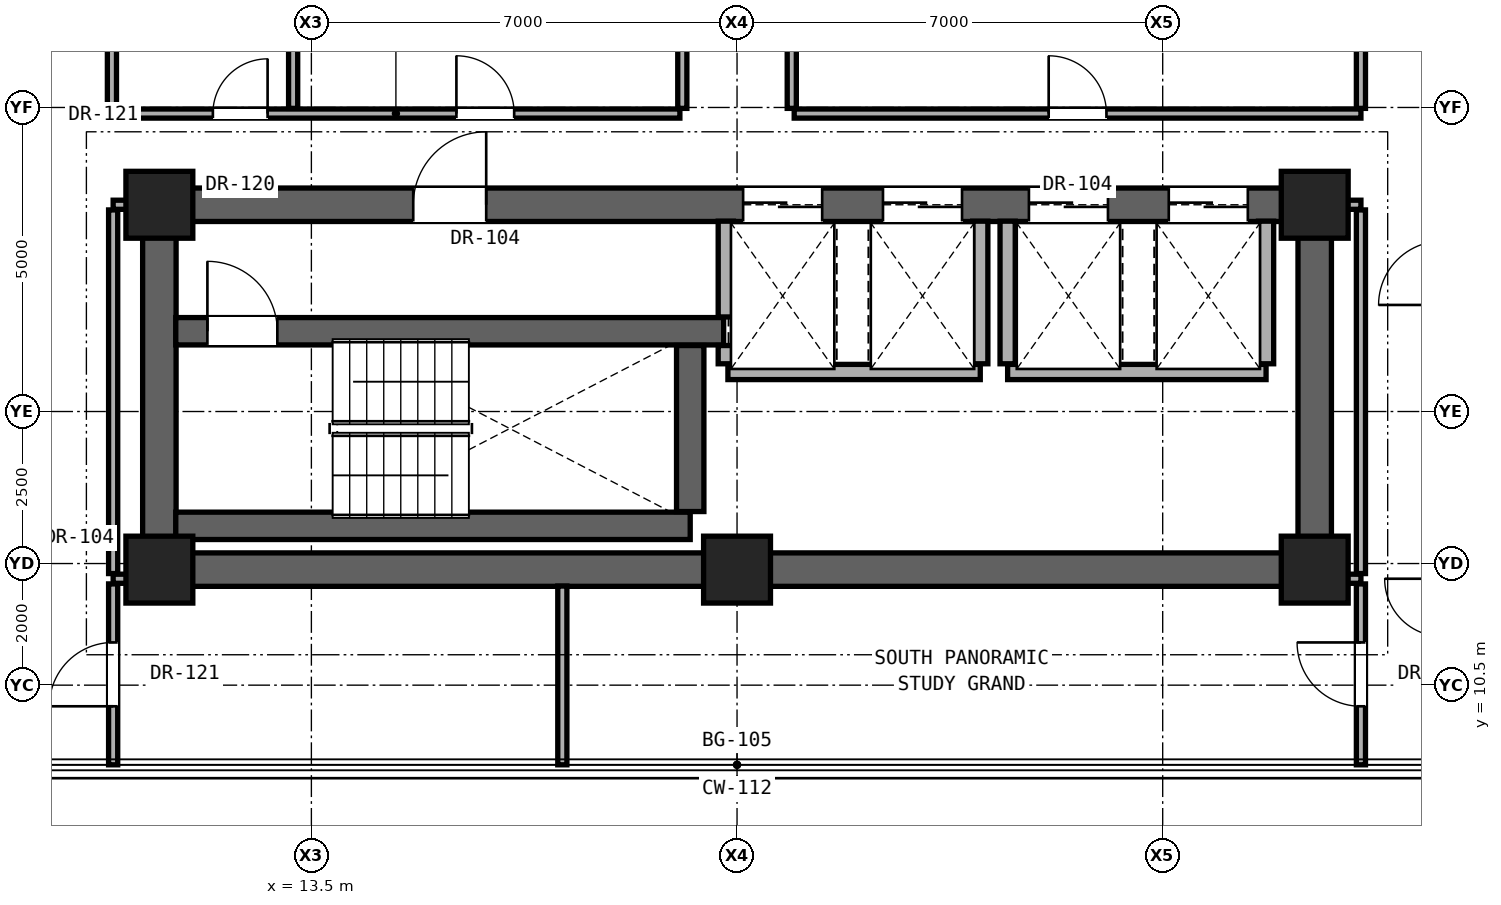
"""IFC4 building model, lengths in metres.
Left out: names, types, materials, properties, quantities, classifications, styles, units other than length and angle.
Written with IfcOpenShell. Run it as: python <this file> out.ifc"""

import sys

from ifc_helpers import new_model, si_unit, direction, frame, frame_2d, origin, origin_2d, place, context, subcontext, project, spatial, rectangle, extrude, element, fill, save


model = new_model("IFC4")
c1 = context("Model", 3, precision=1e-05, world=origin(), true_north=direction((0.0, 1.0)))
c2 = subcontext(c1, "Body", "Model", "MODEL_VIEW")
j1 = project(units=[si_unit("LENGTHUNIT", "METRE"), si_unit("PLANEANGLEUNIT", "RADIAN")], contexts=[c1])
p1 = place(None, origin())
s1 = spatial("IfcSite", under=j1, at=p1, CompositionType="ELEMENT")
p2 = place(p1, origin())
s2 = spatial("IfcBuilding", under=s1, at=p2, CompositionType="ELEMENT")
p3 = place(p2, frame((0.0, 0.0, 134.6)))
s3 = spatial("IfcBuildingStorey", under=s2, at=p3, CompositionType="ELEMENT", Elevation=134.6)
for number, where, z_axis, x_axis in (
    (1, (11.0, 12.4, 0.0), (0.0, 0.0, 1.0), (1.0, 0.0, 0.0)),
    (2, (20.5, 12.4, 0.0), (0.0, 0.0, 1.0), (1.0, 0.0, 0.0)),
    (3, (30.0, 12.4, 0.0), (0.0, 0.0, 1.0), (1.0, 0.0, 0.0)),
    (4, (11.0, 18.4, 0.0), (0.0, 0.0, 1.0), (1.0, 0.0, 0.0)),
    (5, (30.0, 18.4, 0.0), (0.0, 0.0, 1.0), (1.0, 0.0, 0.0)),
):
    element("IfcColumn", number, at=place(p3, frame(where, z_axis=z_axis, x_axis=x_axis)), inside=s3, PredefinedType="COLUMN", context=c2, shape_type="SweptSolid", body=[
        extrude(rectangle(XDim=1.1, YDim=1.1, at=origin_2d()), origin(), (0.0, 0.0, 1.0), 3.3),
    ])
p4 = place(p3, frame((11.0, 12.4, 0.0), z_axis=(0.0, 0.0, 1.0), x_axis=(1.0, 0.0, 0.0)))
e6 = element("IfcWall", 6, at=p4, inside=s3, PredefinedType="SHEAR", context=c2, shape_type="SweptSolid", body=[
    extrude(rectangle(XDim=19.0, YDim=0.55, at=frame_2d((9.5, 0.0))), origin(), (0.0, 0.0, 1.0), 3.08),
])
for number, where, z_axis, x_axis in (
    (7, (11.0, 12.4, 0.0), (0.0, 0.0, 1.0), (0.0, 1.0, 0.0)),
    (8, (30.0, 12.4, 0.0), (0.0, 0.0, 1.0), (0.0, 1.0, 0.0)),
):
    element("IfcWall", number, at=place(p3, frame(where, z_axis=z_axis, x_axis=x_axis)), inside=s3, PredefinedType="SHEAR", context=c2, shape_type="SweptSolid", body=[
        extrude(rectangle(XDim=6.0, YDim=0.55, at=frame_2d((3.0, 0.0))), origin(), (0.0, 0.0, 1.0), 3.08),
    ])
p5 = place(p3, frame((11.0, 18.4, 0.0), z_axis=(0.0, 0.0, 1.0), x_axis=(1.0, 0.0, 0.0)))
e9 = element("IfcWall", 9, at=p5, inside=s3, PredefinedType="SHEAR", context=c2, shape_type="SweptSolid", body=[
    extrude(rectangle(XDim=19.0, YDim=0.55, at=frame_2d((9.5, 0.0))), origin(), (0.0, 0.0, 1.0), 3.08),
])
p6 = place(p5, frame((4.175, 0.0, 0.0)))
e10 = element("IfcOpeningElement", 10, at=p6, cuts=e9, PredefinedType="OPENING", context=c2, shape_type="SweptSolid", body=[
    extrude(rectangle(XDim=1.2, YDim=2.25, at=frame_2d((0.6, 1.125))), frame((0.0, 0.285, 0.0), z_axis=(0.0, -1.0, 0.0), x_axis=(1.0, 0.0, 0.0)), (0.0, 0.0, 1.0), 0.57),
])
p7 = place(p5, frame((9.6, 0.0, 0.0)))
e11 = element("IfcOpeningElement", 11, at=p7, cuts=e9, PredefinedType="OPENING", context=c2, shape_type="SweptSolid", body=[
    extrude(rectangle(XDim=1.3, YDim=2.3, at=frame_2d((0.65, 1.15))), frame((0.0, 0.285, 0.0), z_axis=(0.0, -1.0, 0.0), x_axis=(1.0, 0.0, 0.0)), (0.0, 0.0, 1.0), 0.57),
])
p8 = place(p5, frame((11.9, 0.0, 0.0)))
e12 = element("IfcOpeningElement", 12, at=p8, cuts=e9, PredefinedType="OPENING", context=c2, shape_type="SweptSolid", body=[
    extrude(rectangle(XDim=1.3, YDim=2.3, at=frame_2d((0.65, 1.15))), frame((0.0, 0.285, 0.0), z_axis=(0.0, -1.0, 0.0), x_axis=(1.0, 0.0, 0.0)), (0.0, 0.0, 1.0), 0.57),
])
p9 = place(p5, frame((14.3, 0.0, 0.0)))
e13 = element("IfcOpeningElement", 13, at=p9, cuts=e9, PredefinedType="OPENING", context=c2, shape_type="SweptSolid", body=[
    extrude(rectangle(XDim=1.3, YDim=2.3, at=frame_2d((0.65, 1.15))), frame((0.0, 0.285, 0.0), z_axis=(0.0, -1.0, 0.0), x_axis=(1.0, 0.0, 0.0)), (0.0, 0.0, 1.0), 0.57),
])
p10 = place(p5, frame((16.6, 0.0, 0.0)))
e14 = element("IfcOpeningElement", 14, at=p10, cuts=e9, PredefinedType="OPENING", context=c2, shape_type="SweptSolid", body=[
    extrude(rectangle(XDim=1.3, YDim=2.3, at=frame_2d((0.65, 1.15))), frame((0.0, 0.285, 0.0), z_axis=(0.0, -1.0, 0.0), x_axis=(1.0, 0.0, 0.0)), (0.0, 0.0, 1.0), 0.57),
])
for number, where, z_axis, x_axis in (
    (15, (10.24, 12.25, 0.0), (0.0, 0.0, 1.0), (1.0, 0.0, 0.0)),
    (16, (30.27, 12.25, 0.0), (0.0, 0.0, 1.0), (1.0, 0.0, 0.0)),
):
    element("IfcWall", number, at=place(p3, frame(where, z_axis=z_axis, x_axis=x_axis)), inside=s3, PredefinedType="PARTITIONING", context=c2, shape_type="SweptSolid", body=[
        extrude(rectangle(XDim=0.49, YDim=0.15, at=frame_2d((0.245, 0.0))), origin(), (0.0, 0.0, 1.0), 3.08),
    ])
p11 = place(p3, frame((11.27, 13.12, 0.0), z_axis=(0.0, 0.0, 1.0), x_axis=(1.0, 0.0, 0.0)))
e17 = element("IfcWall", 17, at=p11, inside=s3, PredefinedType="SHEAR", context=c2, shape_type="SweptSolid", body=[
    extrude(rectangle(XDim=8.46, YDim=0.45, at=frame_2d((4.23, 0.0))), origin(), (0.0, 0.0, 1.0), 3.08),
])
p12 = place(p3, frame((20.35, 15.65, 0.0), z_axis=(0.0, 0.0, 1.0), x_axis=(1.0, 0.0, 0.0)))
e18 = element("IfcWall", 18, at=p12, inside=s3, PredefinedType="SOLIDWALL", context=c2, shape_type="SweptSolid", body=[
    extrude(rectangle(XDim=4.15, YDim=0.25, at=frame_2d((2.075, 0.0))), origin(), (0.0, 0.0, 1.0), 3.08),
])
p13 = place(p3, frame((24.95, 15.65, 0.0), z_axis=(0.0, 0.0, 1.0), x_axis=(1.0, 0.0, 0.0)))
e19 = element("IfcWall", 19, at=p13, inside=s3, PredefinedType="SOLIDWALL", context=c2, shape_type="SweptSolid", body=[
    extrude(rectangle(XDim=4.25, YDim=0.25, at=frame_2d((2.125, 0.0))), origin(), (0.0, 0.0, 1.0), 3.08),
])
p14 = place(p3, frame((11.27, 16.32, 0.0), z_axis=(0.0, 0.0, 1.0), x_axis=(1.0, 0.0, 0.0)))
e20 = element("IfcWall", 20, at=p14, inside=s3, PredefinedType="SHEAR", context=c2, shape_type="SweptSolid", body=[
    extrude(rectangle(XDim=9.01, YDim=0.45, at=frame_2d((4.505, 0.0))), origin(), (0.0, 0.0, 1.0), 3.08),
])
p15 = place(p14, frame((0.52, 0.0, 0.0)))
e21 = element("IfcOpeningElement", 21, at=p15, cuts=e20, PredefinedType="OPENING", context=c2, shape_type="SweptSolid", body=[
    extrude(rectangle(XDim=1.15, YDim=2.2, at=frame_2d((0.575, 1.1))), frame((0.0, 0.235, 0.0), z_axis=(0.0, -1.0, 0.0), x_axis=(1.0, 0.0, 0.0)), (0.0, 0.0, 1.0), 0.47),
])
for number, where, z_axis, x_axis in (
    (22, (10.24, 18.4, 0.0), (0.0, 0.0, 1.0), (1.0, 0.0, 0.0)),
    (23, (30.27, 18.4, 0.0), (0.0, 0.0, 1.0), (1.0, 0.0, 0.0)),
):
    element("IfcWall", number, at=place(p3, frame(where, z_axis=z_axis, x_axis=x_axis)), inside=s3, PredefinedType="PARTITIONING", context=c2, shape_type="SweptSolid", body=[
        extrude(rectangle(XDim=0.49, YDim=0.15, at=frame_2d((0.245, 0.0))), origin(), (0.0, 0.0, 1.0), 2.456),
    ])
p16 = place(p3, frame((10.22, 19.9, 0.0), z_axis=(0.0, 0.0, 1.0), x_axis=(1.0, 0.0, 0.0)))
e24 = element("IfcWall", 24, at=p16, inside=s3, PredefinedType="PARTITIONING", context=c2, shape_type="SweptSolid", body=[
    extrude(rectangle(XDim=9.34, YDim=0.15, at=frame_2d((4.67, 0.0))), origin(), (0.0, 0.0, 1.0), 2.216),
])
p17 = place(p16, frame((1.66, 0.0, 0.0)))
e25 = element("IfcOpeningElement", 25, at=p17, cuts=e24, PredefinedType="OPENING", context=c2, shape_type="SweptSolid", body=[
    extrude(rectangle(XDim=0.9, YDim=2.1, at=frame_2d((0.45, 1.05))), frame((0.0, 0.085, 0.0), z_axis=(0.0, -1.0, 0.0), x_axis=(1.0, 0.0, 0.0)), (0.0, 0.0, 1.0), 0.17),
])
p18 = place(p16, frame((5.665, 0.0, 0.0)))
e26 = element("IfcOpeningElement", 26, at=p18, cuts=e24, PredefinedType="OPENING", context=c2, shape_type="SweptSolid", body=[
    extrude(rectangle(XDim=0.95, YDim=2.15, at=frame_2d((0.475, 1.075))), frame((0.0, 0.085, 0.0), z_axis=(0.0, -1.0, 0.0), x_axis=(1.0, 0.0, 0.0)), (0.0, 0.0, 1.0), 0.17),
])
p19 = place(p3, frame((21.44, 19.9, 0.0), z_axis=(0.0, 0.0, 1.0), x_axis=(1.0, 0.0, 0.0)))
e27 = element("IfcWall", 27, at=p19, inside=s3, PredefinedType="PARTITIONING", context=c2, shape_type="SweptSolid", body=[
    extrude(rectangle(XDim=9.32, YDim=0.15, at=frame_2d((4.66, 0.0))), origin(), (0.0, 0.0, 1.0), 2.216),
])
p20 = place(p19, frame((4.185, 0.0, 0.0)))
e28 = element("IfcOpeningElement", 28, at=p20, cuts=e27, PredefinedType="OPENING", context=c2, shape_type="SweptSolid", body=[
    extrude(rectangle(XDim=0.95, YDim=2.15, at=frame_2d((0.475, 1.075))), frame((0.0, 0.085, 0.0), z_axis=(0.0, -1.0, 0.0), x_axis=(1.0, 0.0, 0.0)), (0.0, 0.0, 1.0), 0.17),
])
p21 = place(p3, frame((10.22, 19.985, 0.0), z_axis=(0.0, 0.0, 1.0), x_axis=(0.0, 1.0, 0.0)))
e29 = element("IfcWall", 29, at=p21, inside=s3, PredefinedType="PARTITIONING", context=c2, shape_type="SweptSolid", body=[
    extrude(rectangle(XDim=2.78, YDim=0.15, at=frame_2d((1.39, 0.0))), origin(), (0.0, 0.0, 1.0), 3.08),
])
p22 = place(p3, frame((10.24, 9.19, 0.0), z_axis=(0.0, 0.0, 1.0), x_axis=(0.0, 1.0, 0.0)))
e30 = element("IfcWall", 30, at=p22, inside=s3, PredefinedType="PARTITIONING", context=c2, shape_type="SweptSolid", body=[
    extrude(rectangle(XDim=2.975, YDim=0.15, at=frame_2d((1.488, 0.0))), origin(), (0.0, 0.0, 1.0), 3.08),
])
p23 = place(p22, frame((0.962, 0.0, 0.0)))
e31 = element("IfcOpeningElement", 31, at=p23, cuts=e30, PredefinedType="OPENING", context=c2, shape_type="SweptSolid", body=[
    extrude(rectangle(XDim=1.05, YDim=2.2, at=frame_2d((0.525, 1.1))), frame((0.0, 0.085, 0.0), z_axis=(0.0, -1.0, 0.0), x_axis=(1.0, 0.0, 0.0)), (0.0, 0.0, 1.0), 0.17),
])
p24 = place(p3, frame((10.24, 12.335, 0.0), z_axis=(0.0, 0.0, 1.0), x_axis=(0.0, 1.0, 0.0)))
e32 = element("IfcWall", 32, at=p24, inside=s3, PredefinedType="PARTITIONING", context=c2, shape_type="SweptSolid", body=[
    extrude(rectangle(XDim=5.98, YDim=0.15, at=frame_2d((2.99, 0.0))), origin(), (0.0, 0.0, 1.0), 2.456),
])
p25 = place(p3, frame((13.2, 19.985, 0.0), z_axis=(0.0, 0.0, 1.0), x_axis=(0.0, 1.0, 0.0)))
e33 = element("IfcWall", 33, at=p25, inside=s3, PredefinedType="PARTITIONING", context=c2, shape_type="SweptSolid", body=[
    extrude(rectangle(XDim=2.78, YDim=0.15, at=frame_2d((1.39, 0.0))), origin(), (0.0, 0.0, 1.0), 3.08),
])
p26 = place(p3, frame((17.627, 9.19, 0.0), z_axis=(0.0, 0.0, 1.0), x_axis=(0.0, 1.0, 0.0)))
e34 = element("IfcWall", 34, at=p26, inside=s3, PredefinedType="PARTITIONING", context=c2, shape_type="SweptSolid", body=[
    extrude(rectangle(XDim=2.94, YDim=0.15, at=frame_2d((1.47, 0.0))), origin(), (0.0, 0.0, 1.0), 3.08),
])
p27 = place(p3, frame((19.6, 19.985, 0.0), z_axis=(0.0, 0.0, 1.0), x_axis=(0.0, 1.0, 0.0)))
e35 = element("IfcWall", 35, at=p27, inside=s3, PredefinedType="PARTITIONING", context=c2, shape_type="SweptSolid", body=[
    extrude(rectangle(XDim=5.53, YDim=0.15, at=frame_2d((2.765, 0.0))), origin(), (0.0, 0.0, 1.0), 2.216),
])
p28 = place(p3, frame((19.73, 13.355, 0.0), z_axis=(0.0, 0.0, 1.0), x_axis=(0.0, 1.0, 0.0)))
e36 = element("IfcWall", 36, at=p28, inside=s3, PredefinedType="SHEAR", context=c2, shape_type="SweptSolid", body=[
    extrude(rectangle(XDim=2.73, YDim=0.45, at=frame_2d((1.365, 0.0))), origin(), (0.0, 0.0, 1.0), 3.08),
])
p29 = place(p3, frame((20.315, 15.785, 0.0), z_axis=(0.0, 0.0, 1.0), x_axis=(0.0, 1.0, 0.0)))
e37 = element("IfcWall", 37, at=p29, inside=s3, PredefinedType="SOLIDWALL", context=c2, shape_type="SweptSolid", body=[
    extrude(rectangle(XDim=0.3, YDim=0.25, at=frame_2d((0.15, 0.0))), origin(), (0.0, 0.0, 1.0), 3.08),
])
p30 = place(p3, frame((20.315, 16.555, 0.0), z_axis=(0.0, 0.0, 1.0), x_axis=(0.0, 1.0, 0.0)))
e38 = element("IfcWall", 38, at=p30, inside=s3, PredefinedType="SOLIDWALL", context=c2, shape_type="SweptSolid", body=[
    extrude(rectangle(XDim=1.575, YDim=0.25, at=frame_2d((0.788, 0.0))), origin(), (0.0, 0.0, 1.0), 3.08),
])
p31 = place(p3, frame((21.4, 19.985, 0.0), z_axis=(0.0, 0.0, 1.0), x_axis=(0.0, 1.0, 0.0)))
e39 = element("IfcWall", 39, at=p31, inside=s3, PredefinedType="PARTITIONING", context=c2, shape_type="SweptSolid", body=[
    extrude(rectangle(XDim=5.53, YDim=0.15, at=frame_2d((2.765, 0.0))), origin(), (0.0, 0.0, 1.0), 2.216),
])
for number, where, z_axis, x_axis in (
    (40, (24.5, 15.785, 0.0), (0.0, 0.0, 1.0), (0.0, 1.0, 0.0)),
    (41, (24.95, 15.785, 0.0), (0.0, 0.0, 1.0), (0.0, 1.0, 0.0)),
    (42, (29.2, 15.785, 0.0), (0.0, 0.0, 1.0), (0.0, 1.0, 0.0)),
):
    element("IfcWall", number, at=place(p3, frame(where, z_axis=z_axis, x_axis=x_axis)), inside=s3, PredefinedType="SOLIDWALL", context=c2, shape_type="SweptSolid", body=[
        extrude(rectangle(XDim=2.345, YDim=0.25, at=frame_2d((1.172, 0.0))), origin(), (0.0, 0.0, 1.0), 3.08),
    ])
p32 = place(p3, frame((30.76, 9.19, 0.0), z_axis=(0.0, 0.0, 1.0), x_axis=(0.0, 1.0, 0.0)))
e43 = element("IfcWall", 43, at=p32, inside=s3, PredefinedType="PARTITIONING", context=c2, shape_type="SweptSolid", body=[
    extrude(rectangle(XDim=2.975, YDim=0.15, at=frame_2d((1.488, 0.0))), origin(), (0.0, 0.0, 1.0), 3.08),
])
p33 = place(p32, frame((0.962, 0.0, 0.0)))
e44 = element("IfcOpeningElement", 44, at=p33, cuts=e43, PredefinedType="OPENING", context=c2, shape_type="SweptSolid", body=[
    extrude(rectangle(XDim=1.05, YDim=2.2, at=frame_2d((0.525, 1.1))), frame((0.0, 0.085, 0.0), z_axis=(0.0, -1.0, 0.0), x_axis=(1.0, 0.0, 0.0)), (0.0, 0.0, 1.0), 0.17),
])
p34 = place(p3, frame((30.76, 12.335, 0.0), z_axis=(0.0, 0.0, 1.0), x_axis=(0.0, 1.0, 0.0)))
e45 = element("IfcWall", 45, at=p34, inside=s3, PredefinedType="PARTITIONING", context=c2, shape_type="SweptSolid", body=[
    extrude(rectangle(XDim=5.98, YDim=0.15, at=frame_2d((2.99, 0.0))), origin(), (0.0, 0.0, 1.0), 2.456),
])
p35 = place(p3, frame((30.76, 19.985, 0.0), z_axis=(0.0, 0.0, 1.0), x_axis=(0.0, 1.0, 0.0)))
e46 = element("IfcWall", 46, at=p35, inside=s3, PredefinedType="PARTITIONING", context=c2, shape_type="SweptSolid", body=[
    extrude(rectangle(XDim=5.53, YDim=0.15, at=frame_2d((2.765, 0.0))), origin(), (0.0, 0.0, 1.0), 2.299),
])
p36 = place(p6, origin())
e47 = element("IfcDoor", 47, at=p36, inside=s3, OperationType="SINGLE_SWING_RIGHT", PredefinedType="DOOR", context=c2, shape_type="SweptSolid", body=[
    extrude(rectangle(XDim=1.2, YDim=2.25, at=frame_2d((0.6, 1.125))), frame((0.0, 0.025, 0.0), z_axis=(0.0, -1.0, 0.0), x_axis=(1.0, 0.0, 0.0)), (0.0, 0.0, 1.0), 0.05),
])
fill(e10, e47)
p37 = place(p15, origin())
e48 = element("IfcDoor", 48, at=p37, inside=s3, OperationType="SINGLE_SWING_LEFT", PredefinedType="DOOR", context=c2, shape_type="SweptSolid", body=[
    extrude(rectangle(XDim=1.15, YDim=2.2, at=frame_2d((0.575, 1.1))), frame((0.0, 0.025, 0.0), z_axis=(0.0, -1.0, 0.0), x_axis=(1.0, 0.0, 0.0)), (0.0, 0.0, 1.0), 0.05),
])
fill(e21, e48)
p38 = place(p17, origin())
e49 = element("IfcDoor", 49, at=p38, inside=s3, OperationType="SINGLE_SWING_RIGHT", PredefinedType="DOOR", context=c2, shape_type="SweptSolid", body=[
    extrude(rectangle(XDim=0.9, YDim=2.1, at=frame_2d((0.45, 1.05))), frame((0.0, 0.025, 0.0), z_axis=(0.0, -1.0, 0.0), x_axis=(1.0, 0.0, 0.0)), (0.0, 0.0, 1.0), 0.05),
])
fill(e25, e49)
p39 = place(p18, origin())
e50 = element("IfcDoor", 50, at=p39, inside=s3, OperationType="SINGLE_SWING_LEFT", PredefinedType="DOOR", context=c2, shape_type="SweptSolid", body=[
    extrude(rectangle(XDim=0.95, YDim=2.15, at=frame_2d((0.475, 1.075))), frame((0.0, 0.025, 0.0), z_axis=(0.0, -1.0, 0.0), x_axis=(1.0, 0.0, 0.0)), (0.0, 0.0, 1.0), 0.05),
])
fill(e26, e50)
p40 = place(p20, origin())
e51 = element("IfcDoor", 51, at=p40, inside=s3, OperationType="SINGLE_SWING_LEFT", PredefinedType="DOOR", context=c2, shape_type="SweptSolid", body=[
    extrude(rectangle(XDim=0.95, YDim=2.15, at=frame_2d((0.475, 1.075))), frame((0.0, 0.025, 0.0), z_axis=(0.0, -1.0, 0.0), x_axis=(1.0, 0.0, 0.0)), (0.0, 0.0, 1.0), 0.05),
])
fill(e28, e51)
p41 = place(p23, origin())
e52 = element("IfcDoor", 52, at=p41, inside=s3, OperationType="SINGLE_SWING_LEFT", PredefinedType="DOOR", context=c2, shape_type="SweptSolid", body=[
    extrude(rectangle(XDim=1.05, YDim=2.2, at=frame_2d((0.525, 1.1))), frame((0.0, 0.025, 0.0), z_axis=(0.0, -1.0, 0.0), x_axis=(1.0, 0.0, 0.0)), (0.0, 0.0, 1.0), 0.05),
])
fill(e31, e52)
p42 = place(p33, origin())
e53 = element("IfcDoor", 53, at=p42, inside=s3, OperationType="SINGLE_SWING_RIGHT", PredefinedType="DOOR", context=c2, shape_type="SweptSolid", body=[
    extrude(rectangle(XDim=1.05, YDim=2.2, at=frame_2d((0.525, 1.1))), frame((0.0, 0.025, 0.0), z_axis=(0.0, -1.0, 0.0), x_axis=(1.0, 0.0, 0.0)), (0.0, 0.0, 1.0), 0.05),
])
fill(e44, e53)
p43 = place(p7, origin())
e54 = element("IfcDoor", 54, at=p43, inside=s3, OperationType="DOUBLE_DOOR_SLIDING", PredefinedType="DOOR", context=c2, shape_type="SweptSolid", body=[
    extrude(rectangle(XDim=1.3, YDim=2.3, at=frame_2d((0.65, 1.15))), frame((0.0, 0.025, 0.0), z_axis=(0.0, -1.0, 0.0), x_axis=(1.0, 0.0, 0.0)), (0.0, 0.0, 1.0), 0.05),
])
fill(e11, e54)
p44 = place(p8, origin())
e55 = element("IfcDoor", 55, at=p44, inside=s3, OperationType="DOUBLE_DOOR_SLIDING", PredefinedType="DOOR", context=c2, shape_type="SweptSolid", body=[
    extrude(rectangle(XDim=1.3, YDim=2.3, at=frame_2d((0.65, 1.15))), frame((0.0, 0.025, 0.0), z_axis=(0.0, -1.0, 0.0), x_axis=(1.0, 0.0, 0.0)), (0.0, 0.0, 1.0), 0.05),
])
fill(e12, e55)
p45 = place(p9, origin())
e56 = element("IfcDoor", 56, at=p45, inside=s3, OperationType="DOUBLE_DOOR_SLIDING", PredefinedType="DOOR", context=c2, shape_type="SweptSolid", body=[
    extrude(rectangle(XDim=1.3, YDim=2.3, at=frame_2d((0.65, 1.15))), frame((0.0, 0.025, 0.0), z_axis=(0.0, -1.0, 0.0), x_axis=(1.0, 0.0, 0.0)), (0.0, 0.0, 1.0), 0.05),
])
fill(e13, e56)
p46 = place(p10, origin())
e57 = element("IfcDoor", 57, at=p46, inside=s3, OperationType="DOUBLE_DOOR_SLIDING", PredefinedType="DOOR", context=c2, shape_type="SweptSolid", body=[
    extrude(rectangle(XDim=1.3, YDim=2.3, at=frame_2d((0.65, 1.15))), frame((0.0, 0.025, 0.0), z_axis=(0.0, -1.0, 0.0), x_axis=(1.0, 0.0, 0.0)), (0.0, 0.0, 1.0), 0.05),
])
fill(e14, e57)
save(model, sys.argv[1])
